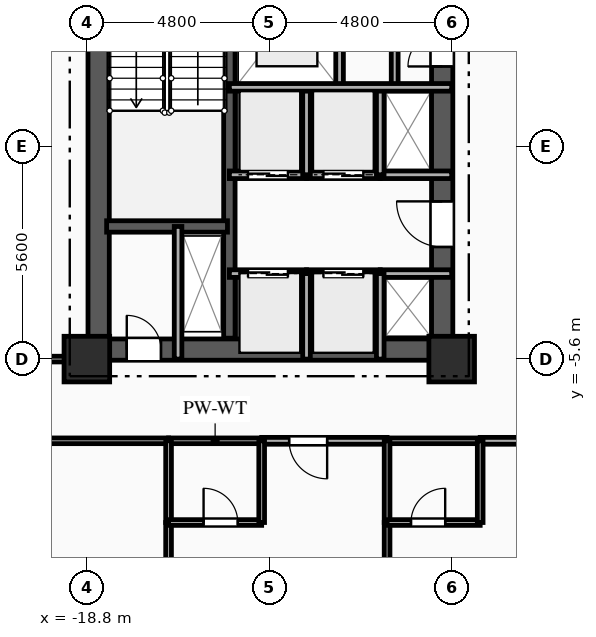
"""IFC4 building model, lengths in metres.
Left out: names, types, materials, properties, quantities, classifications, styles, units other than length and angle.
Written with IfcOpenShell. Run it as: python <this file> out.ifc"""

import sys

from ifc_helpers import new_model, si_unit, direction, frame, frame_2d, origin, origin_2d, place, context, subcontext, project, spatial, rectangle, extrude, element, fill, save


model = new_model("IFC4")
c1 = context("Model", 3, precision=1e-05, world=origin(), true_north=direction((0.0, 1.0)))
c2 = subcontext(c1, "Body", "Model", "MODEL_VIEW")
j1 = project(units=[si_unit("LENGTHUNIT", "METRE"), si_unit("PLANEANGLEUNIT", "RADIAN")], contexts=[c1])
p1 = place(None, origin())
s1 = spatial("IfcSite", under=j1, at=p1, CompositionType="ELEMENT")
p2 = place(p1, origin())
s2 = spatial("IfcBuilding", under=s1, at=p2, CompositionType="ELEMENT")
p3 = place(p2, frame((0.0, 0.0, 70.55)))
s3 = spatial("IfcBuildingStorey", under=s2, at=p3, CompositionType="ELEMENT", Elevation=70.55)
for number, where, z_axis, x_axis in (
    (1, (-18.8, -5.6, 0.0), (0.0, 0.0, 1.0), (1.0, 0.0, 0.0)),
    (2, (-9.2, -5.6, 0.0), (0.0, 0.0, 1.0), (1.0, 0.0, 0.0)),
):
    element("IfcColumn", number, at=place(p3, frame(where, z_axis=z_axis, x_axis=x_axis)), inside=s3, PredefinedType="COLUMN", context=c2, shape_type="SweptSolid", body=[
        extrude(rectangle(XDim=1.2, YDim=1.2, at=origin_2d()), origin(), (0.0, 0.0, 1.0), 3.35),
    ])
p4 = place(p3, frame((-18.8, -5.35, 0.0), z_axis=(0.0, 0.0, 1.0), x_axis=(1.0, 0.0, 0.0)))
e3 = element("IfcWall", 3, at=p4, inside=s3, PredefinedType="SHEAR", context=c2, shape_type="SweptSolid", body=[
    extrude(rectangle(XDim=9.6, YDim=0.56, at=frame_2d((4.8, 0.0))), origin(), (0.0, 0.0, 1.0), 3.0),
])
p5 = place(p4, frame((1.05, 0.0, 0.0)))
e4 = element("IfcOpeningElement", 4, at=p5, cuts=e3, PredefinedType="OPENING", context=c2, shape_type="SweptSolid", body=[
    extrude(rectangle(XDim=0.9, YDim=2.1, at=frame_2d((0.45, 1.05))), frame((0.0, 0.29, 0.0), z_axis=(0.0, -1.0, 0.0), x_axis=(1.0, 0.0, 0.0)), (0.0, 0.0, 1.0), 0.58),
])
p6 = place(p3, frame((-18.49, -5.05, 0.0), z_axis=(0.0, 0.0, 1.0), x_axis=(0.0, 1.0, 0.0)))
e5 = element("IfcWall", 5, at=p6, inside=s3, PredefinedType="SHEAR", context=c2, shape_type="SweptSolid", body=[
    extrude(rectangle(XDim=10.1, YDim=0.56, at=frame_2d((5.05, 0.0))), origin(), (0.0, 0.0, 1.0), 3.0),
])
p7 = place(p3, frame((-9.45, -5.05, 0.0), z_axis=(0.0, 0.0, 1.0), x_axis=(0.0, 1.0, 0.0)))
e6 = element("IfcWall", 6, at=p7, inside=s3, PredefinedType="SHEAR", context=c2, shape_type="SweptSolid", body=[
    extrude(rectangle(XDim=10.1, YDim=0.56, at=frame_2d((5.05, 0.0))), origin(), (0.0, 0.0, 1.0), 3.0),
])
p8 = place(p7, frame((7.15, 0.0, 0.0)))
e7 = element("IfcOpeningElement", 7, at=p8, cuts=e6, PredefinedType="OPENING", context=c2, shape_type="SweptSolid", body=[
    extrude(rectangle(XDim=0.9, YDim=2.1, at=frame_2d((0.45, 1.05))), frame((0.0, 0.29, 0.0), z_axis=(0.0, -1.0, 0.0), x_axis=(1.0, 0.0, 0.0)), (0.0, 0.0, 1.0), 0.58),
])
p9 = place(p7, frame((2.4, 0.0, 0.0)))
e8 = element("IfcOpeningElement", 8, at=p9, cuts=e6, PredefinedType="OPENING", context=c2, shape_type="SweptSolid", body=[
    extrude(rectangle(XDim=1.2, YDim=2.15, at=frame_2d((0.6, 1.075))), frame((0.0, 0.29, 0.0), z_axis=(0.0, -1.0, 0.0), x_axis=(1.0, 0.0, 0.0)), (0.0, 0.0, 1.0), 0.58),
])
p10 = place(p3, frame((-15.05, -5.05, 0.0), z_axis=(0.0, 0.0, 1.0), x_axis=(0.0, 1.0, 0.0)))
e9 = element("IfcWall", 9, at=p10, inside=s3, PredefinedType="SHEAR", context=c2, shape_type="SweptSolid", body=[
    extrude(rectangle(XDim=10.1, YDim=0.3, at=frame_2d((5.05, 0.0))), origin(), (0.0, 0.0, 1.0), 3.0),
])
p11 = place(p3, frame((-18.28, -2.11, 0.0), z_axis=(0.0, 0.0, 1.0), x_axis=(1.0, 0.0, 0.0)))
e10 = element("IfcWall", 10, at=p11, inside=s3, PredefinedType="SHEAR", context=c2, shape_type="SweptSolid", body=[
    extrude(rectangle(XDim=3.18, YDim=0.3, at=frame_2d((1.59, 0.0))), origin(), (0.0, 0.0, 1.0), 3.0),
])
p12 = place(p3, frame((-16.4, -5.6, 0.0), z_axis=(0.0, 0.0, 1.0), x_axis=(0.0, 1.0, 0.0)))
e11 = element("IfcWall", 11, at=p12, inside=s3, PredefinedType="PARTITIONING", context=c2, shape_type="SweptSolid", body=[
    extrude(rectangle(XDim=3.49, YDim=0.2, at=frame_2d((1.745, 0.0))), origin(), (0.0, 0.0, 1.0), 3.0),
])
p13 = place(p3, frame((-12.15, 1.55, 0.0), z_axis=(0.0, 0.0, 1.0), x_axis=(0.0, 1.0, 0.0)))
e12 = element("IfcWall", 12, at=p13, inside=s3, PredefinedType="PARTITIONING", context=c2, shape_type="SweptSolid", body=[
    extrude(rectangle(XDim=4.05, YDim=0.2, at=frame_2d((2.025, 0.0))), origin(), (0.0, 0.0, 1.0), 3.0),
])
p14 = place(p3, frame((-10.7, 5.6, 0.0), z_axis=(0.0, 0.0, 1.0), x_axis=(0.0, -1.0, 0.0)))
e13 = element("IfcWall", 13, at=p14, inside=s3, PredefinedType="PARTITIONING", context=c2, shape_type="SweptSolid", body=[
    extrude(rectangle(XDim=4.05, YDim=0.18, at=frame_2d((2.025, 0.0))), origin(), (0.0, 0.0, 1.0), 3.0),
])
p15 = place(p14, frame((1.325, 0.0, 0.0)))
e14 = element("IfcOpeningElement", 14, at=p15, cuts=e13, PredefinedType="OPENING", context=c2, shape_type="SweptSolid", body=[
    extrude(rectangle(XDim=1.25, YDim=2.2, at=frame_2d((0.625, 1.1))), frame((0.0, 0.1, 0.0), z_axis=(0.0, -1.0, 0.0), x_axis=(1.0, 0.0, 0.0)), (0.0, 0.0, 1.0), 0.2),
])
p16 = place(p3, frame((-15.05, -3.35, 0.0), z_axis=(0.0, 0.0, 1.0), x_axis=(1.0, 0.0, 0.0)))
e15 = element("IfcWall", 15, at=p16, inside=s3, PredefinedType="PARTITIONING", context=c2, shape_type="SweptSolid", body=[
    extrude(rectangle(XDim=2.03, YDim=0.2, at=frame_2d((1.015, 0.0))), origin(), (0.0, 0.0, 1.0), 3.0),
])
p17 = place(p16, frame((0.49, 0.0, 0.0)))
e16 = element("IfcOpeningElement", 16, at=p17, cuts=e15, PredefinedType="OPENING", context=c2, shape_type="SweptSolid", body=[
    extrude(rectangle(XDim=1.05, YDim=2.1, at=frame_2d((0.525, 1.05))), frame((0.0, 0.11, 0.0), z_axis=(0.0, -1.0, 0.0), x_axis=(1.0, 0.0, 0.0)), (0.0, 0.0, 1.0), 0.22),
])
p18 = place(p3, frame((-13.02, -3.35, 0.0), z_axis=(0.0, 0.0, 1.0), x_axis=(1.0, 0.0, 0.0)))
e17 = element("IfcWall", 17, at=p18, inside=s3, PredefinedType="PARTITIONING", context=c2, shape_type="SweptSolid", body=[
    extrude(rectangle(XDim=1.94, YDim=0.2, at=frame_2d((0.97, 0.0))), origin(), (0.0, 0.0, 1.0), 3.0),
])
p19 = place(p18, frame((0.445, 0.0, 0.0)))
e18 = element("IfcOpeningElement", 18, at=p19, cuts=e17, PredefinedType="OPENING", context=c2, shape_type="SweptSolid", body=[
    extrude(rectangle(XDim=1.05, YDim=2.1, at=frame_2d((0.525, 1.05))), frame((0.0, 0.11, 0.0), z_axis=(0.0, -1.0, 0.0), x_axis=(1.0, 0.0, 0.0)), (0.0, 0.0, 1.0), 0.22),
])
p20 = place(p3, frame((-11.08, -3.35, 0.0), z_axis=(0.0, 0.0, 1.0), x_axis=(1.0, 0.0, 0.0)))
e19 = element("IfcWall", 19, at=p20, inside=s3, PredefinedType="PARTITIONING", context=c2, shape_type="SweptSolid", body=[
    extrude(rectangle(XDim=1.88, YDim=0.2, at=frame_2d((0.94, 0.0))), origin(), (0.0, 0.0, 1.0), 2.715),
])
p21 = place(p3, frame((-13.02, -0.75, 0.0), z_axis=(0.0, 0.0, 1.0), x_axis=(-1.0, 0.0, 0.0)))
e20 = element("IfcWall", 20, at=p21, inside=s3, PredefinedType="PARTITIONING", context=c2, shape_type="SweptSolid", body=[
    extrude(rectangle(XDim=2.03, YDim=0.2, at=frame_2d((1.015, 0.0))), origin(), (0.0, 0.0, 1.0), 3.0),
])
p22 = place(p21, frame((0.49, 0.0, 0.0)))
e21 = element("IfcOpeningElement", 21, at=p22, cuts=e20, PredefinedType="OPENING", context=c2, shape_type="SweptSolid", body=[
    extrude(rectangle(XDim=1.05, YDim=2.1, at=frame_2d((0.525, 1.05))), frame((0.0, 0.11, 0.0), z_axis=(0.0, -1.0, 0.0), x_axis=(1.0, 0.0, 0.0)), (0.0, 0.0, 1.0), 0.22),
])
p23 = place(p3, frame((-11.08, -0.75, 0.0), z_axis=(0.0, 0.0, 1.0), x_axis=(-1.0, 0.0, 0.0)))
e22 = element("IfcWall", 22, at=p23, inside=s3, PredefinedType="PARTITIONING", context=c2, shape_type="SweptSolid", body=[
    extrude(rectangle(XDim=1.94, YDim=0.2, at=frame_2d((0.97, 0.0))), origin(), (0.0, 0.0, 1.0), 3.0),
])
p24 = place(p23, frame((0.445, 0.0, 0.0)))
e23 = element("IfcOpeningElement", 23, at=p24, cuts=e22, PredefinedType="OPENING", context=c2, shape_type="SweptSolid", body=[
    extrude(rectangle(XDim=1.05, YDim=2.1, at=frame_2d((0.525, 1.05))), frame((0.0, 0.11, 0.0), z_axis=(0.0, -1.0, 0.0), x_axis=(1.0, 0.0, 0.0)), (0.0, 0.0, 1.0), 0.22),
])
p25 = place(p3, frame((-9.2, -0.75, 0.0), z_axis=(0.0, 0.0, 1.0), x_axis=(-1.0, 0.0, 0.0)))
e24 = element("IfcWall", 24, at=p25, inside=s3, PredefinedType="PARTITIONING", context=c2, shape_type="SweptSolid", body=[
    extrude(rectangle(XDim=1.88, YDim=0.2, at=frame_2d((0.94, 0.0))), origin(), (0.0, 0.0, 1.0), 3.0),
])
for number, where, z_axis, x_axis in (
    (25, (-13.02, -5.6, 0.0), (0.0, 0.0, 1.0), (0.0, 1.0, 0.0)),
    (26, (-11.08, -5.6, 0.0), (0.0, 0.0, 1.0), (0.0, 1.0, 0.0)),
):
    element("IfcWall", number, at=place(p3, frame(where, z_axis=z_axis, x_axis=x_axis)), inside=s3, PredefinedType="PARTITIONING", context=c2, shape_type="SweptSolid", body=[
        extrude(rectangle(XDim=2.25, YDim=0.2, at=frame_2d((1.125, 0.0))), origin(), (0.0, 0.0, 1.0), 3.0),
    ])
for number, where, z_axis, x_axis in (
    (27, (-13.02, -0.75, 0.0), (0.0, 0.0, 1.0), (0.0, 1.0, 0.0)),
    (28, (-11.08, -0.75, 0.0), (0.0, 0.0, 1.0), (0.0, 1.0, 0.0)),
):
    element("IfcWall", number, at=place(p3, frame(where, z_axis=z_axis, x_axis=x_axis)), inside=s3, PredefinedType="PARTITIONING", context=c2, shape_type="SweptSolid", body=[
        extrude(rectangle(XDim=2.3, YDim=0.2, at=frame_2d((1.15, 0.0))), origin(), (0.0, 0.0, 1.0), 3.0),
    ])
p26 = place(p3, frame((-23.0, -5.6, 0.0), z_axis=(0.0, 0.0, 1.0), x_axis=(1.0, 0.0, 0.0)))
e29 = element("IfcWall", 29, at=p26, inside=s3, PredefinedType="PARTITIONING", context=c2, shape_type="SweptSolid", body=[
    extrude(rectangle(XDim=4.2, YDim=0.15, at=frame_2d((2.1, 0.0))), origin(), (0.0, 0.0, 1.0), 3.0),
])
p27 = place(p26, frame((0.829, 0.0, 0.0)))
e30 = element("IfcOpeningElement", 30, at=p27, cuts=e29, PredefinedType="OPENING", context=c2, shape_type="SweptSolid", body=[
    extrude(rectangle(XDim=1.05, YDim=2.15, at=frame_2d((0.525, 1.075))), frame((0.0, 0.085, 0.0), z_axis=(0.0, -1.0, 0.0), x_axis=(1.0, 0.0, 0.0)), (0.0, 0.0, 1.0), 0.17),
])
p28 = place(p3, frame((-16.65, -7.75, 0.0), z_axis=(0.0, 0.0, 1.0), x_axis=(-1.0, 0.0, 0.0)))
e31 = element("IfcWall", 31, at=p28, inside=s3, PredefinedType="PARTITIONING", context=c2, shape_type="SweptSolid", body=[
    extrude(rectangle(XDim=6.35, YDim=0.15, at=frame_2d((3.175, 0.0))), origin(), (0.0, 0.0, 1.0), 3.0),
])
p29 = place(p28, frame((4.202, 0.0, 0.0)))
e32 = element("IfcOpeningElement", 32, at=p29, cuts=e31, PredefinedType="OPENING", context=c2, shape_type="SweptSolid", body=[
    extrude(rectangle(XDim=1.05, YDim=2.15, at=frame_2d((0.525, 1.075))), frame((0.0, 0.085, 0.0), z_axis=(0.0, -1.0, 0.0), x_axis=(1.0, 0.0, 0.0)), (0.0, 0.0, 1.0), 0.17),
])
p30 = place(p3, frame((-10.9, -7.75, 0.0), z_axis=(0.0, 0.0, 1.0), x_axis=(-1.0, 0.0, 0.0)))
e33 = element("IfcWall", 33, at=p30, inside=s3, PredefinedType="PARTITIONING", context=c2, shape_type="SweptSolid", body=[
    extrude(rectangle(XDim=3.3, YDim=0.18, at=frame_2d((1.65, 0.0))), origin(), (0.0, 0.0, 1.0), 3.0),
])
p31 = place(p30, frame((1.577, 0.0, 0.0)))
e34 = element("IfcOpeningElement", 34, at=p31, cuts=e33, PredefinedType="OPENING", context=c2, shape_type="SweptSolid", body=[
    extrude(rectangle(XDim=1.0, YDim=2.15, at=frame_2d((0.5, 1.075))), frame((0.0, 0.1, 0.0), z_axis=(0.0, -1.0, 0.0), x_axis=(1.0, 0.0, 0.0)), (0.0, 0.0, 1.0), 0.2),
])
p32 = place(p3, frame((-14.2, -7.75, 0.0), z_axis=(0.0, 0.0, 1.0), x_axis=(-1.0, 0.0, 0.0)))
e35 = element("IfcWall", 35, at=p32, inside=s3, PredefinedType="PLUMBINGWALL", context=c2, shape_type="SweptSolid", body=[
    extrude(rectangle(XDim=2.45, YDim=0.15, at=frame_2d((1.225, 0.0))), origin(), (0.0, 0.0, 1.0), 3.0),
])
p33 = place(p3, frame((-5.15, -7.75, 0.0), z_axis=(0.0, 0.0, 1.0), x_axis=(-1.0, 0.0, 0.0)))
e36 = element("IfcWall", 36, at=p33, inside=s3, PredefinedType="PARTITIONING", context=c2, shape_type="SweptSolid", body=[
    extrude(rectangle(XDim=3.3, YDim=0.18, at=frame_2d((1.65, 0.0))), origin(), (0.0, 0.0, 1.0), 3.0),
])
p34 = place(p33, frame((0.722, 0.0, 0.0)))
e37 = element("IfcOpeningElement", 37, at=p34, cuts=e36, PredefinedType="OPENING", context=c2, shape_type="SweptSolid", body=[
    extrude(rectangle(XDim=1.0, YDim=2.15, at=frame_2d((0.5, 1.075))), frame((0.0, 0.1, 0.0), z_axis=(0.0, -1.0, 0.0), x_axis=(1.0, 0.0, 0.0)), (0.0, 0.0, 1.0), 0.2),
])
p35 = place(p3, frame((-8.45, -7.75, 0.0), z_axis=(0.0, 0.0, 1.0), x_axis=(-1.0, 0.0, 0.0)))
e38 = element("IfcWall", 38, at=p35, inside=s3, PredefinedType="PLUMBINGWALL", context=c2, shape_type="SweptSolid", body=[
    extrude(rectangle(XDim=2.45, YDim=0.15, at=frame_2d((1.225, 0.0))), origin(), (0.0, 0.0, 1.0), 3.0),
])
p36 = place(p3, frame((-16.65, -9.9, 0.0), z_axis=(0.0, 0.0, 1.0), x_axis=(0.0, -1.0, 0.0)))
e39 = element("IfcWall", 39, at=p36, inside=s3, PredefinedType="PARTITIONING", context=c2, shape_type="SweptSolid", body=[
    extrude(rectangle(XDim=9.5, YDim=0.15, at=frame_2d((4.75, 0.0))), origin(), (0.0, 0.0, 1.0), 3.0),
])
p37 = place(p3, frame((-16.65, -7.75, 0.0), z_axis=(0.0, 0.0, 1.0), x_axis=(0.0, -1.0, 0.0)))
e40 = element("IfcWall", 40, at=p37, inside=s3, PredefinedType="PLUMBINGWALL", context=c2, shape_type="SweptSolid", body=[
    extrude(rectangle(XDim=2.15, YDim=0.15, at=frame_2d((1.075, 0.0))), origin(), (0.0, 0.0, 1.0), 3.0),
])
p38 = place(p3, frame((-16.65, -9.9, 0.0), z_axis=(0.0, 0.0, 1.0), x_axis=(1.0, 0.0, 0.0)))
e41 = element("IfcWall", 41, at=p38, inside=s3, PredefinedType="PLUMBINGWALL", context=c2, shape_type="SweptSolid", body=[
    extrude(rectangle(XDim=2.45, YDim=0.15, at=frame_2d((1.225, 0.0))), origin(), (0.0, 0.0, 1.0), 3.0),
])
p39 = place(p38, frame((0.921, 0.0, 0.0)))
e42 = element("IfcOpeningElement", 42, at=p39, cuts=e41, PredefinedType="OPENING", context=c2, shape_type="SweptSolid", body=[
    extrude(rectangle(XDim=0.9, YDim=2.1, at=frame_2d((0.45, 1.05))), frame((0.0, 0.085, 0.0), z_axis=(0.0, -1.0, 0.0), x_axis=(1.0, 0.0, 0.0)), (0.0, 0.0, 1.0), 0.17),
])
p40 = place(p3, frame((-14.2, -9.9, 0.0), z_axis=(0.0, 0.0, 1.0), x_axis=(0.0, 1.0, 0.0)))
e43 = element("IfcWall", 43, at=p40, inside=s3, PredefinedType="PLUMBINGWALL", context=c2, shape_type="SweptSolid", body=[
    extrude(rectangle(XDim=2.15, YDim=0.15, at=frame_2d((1.075, 0.0))), origin(), (0.0, 0.0, 1.0), 3.0),
])
p41 = place(p3, frame((-10.9, -9.9, 0.0), z_axis=(0.0, 0.0, 1.0), x_axis=(0.0, -1.0, 0.0)))
e44 = element("IfcWall", 44, at=p41, inside=s3, PredefinedType="PARTITIONING", context=c2, shape_type="SweptSolid", body=[
    extrude(rectangle(XDim=9.5, YDim=0.15, at=frame_2d((4.75, 0.0))), origin(), (0.0, 0.0, 1.0), 3.0),
])
p42 = place(p3, frame((-10.9, -7.75, 0.0), z_axis=(0.0, 0.0, 1.0), x_axis=(0.0, -1.0, 0.0)))
e45 = element("IfcWall", 45, at=p42, inside=s3, PredefinedType="PLUMBINGWALL", context=c2, shape_type="SweptSolid", body=[
    extrude(rectangle(XDim=2.15, YDim=0.15, at=frame_2d((1.075, 0.0))), origin(), (0.0, 0.0, 1.0), 3.0),
])
p43 = place(p3, frame((-10.9, -9.9, 0.0), z_axis=(0.0, 0.0, 1.0), x_axis=(1.0, 0.0, 0.0)))
e46 = element("IfcWall", 46, at=p43, inside=s3, PredefinedType="PLUMBINGWALL", context=c2, shape_type="SweptSolid", body=[
    extrude(rectangle(XDim=2.45, YDim=0.15, at=frame_2d((1.225, 0.0))), origin(), (0.0, 0.0, 1.0), 3.0),
])
p44 = place(p43, frame((0.629, 0.0, 0.0)))
e47 = element("IfcOpeningElement", 47, at=p44, cuts=e46, PredefinedType="OPENING", context=c2, shape_type="SweptSolid", body=[
    extrude(rectangle(XDim=0.9, YDim=2.1, at=frame_2d((0.45, 1.05))), frame((0.0, 0.085, 0.0), z_axis=(0.0, -1.0, 0.0), x_axis=(1.0, 0.0, 0.0)), (0.0, 0.0, 1.0), 0.17),
])
p45 = place(p3, frame((-8.45, -9.9, 0.0), z_axis=(0.0, 0.0, 1.0), x_axis=(0.0, 1.0, 0.0)))
e48 = element("IfcWall", 48, at=p45, inside=s3, PredefinedType="PLUMBINGWALL", context=c2, shape_type="SweptSolid", body=[
    extrude(rectangle(XDim=2.15, YDim=0.15, at=frame_2d((1.075, 0.0))), origin(), (0.0, 0.0, 1.0), 3.0),
])
p46 = place(p3, frame((-15.05, 1.55, 0.0), z_axis=(0.0, 0.0, 1.0), x_axis=(1.0, 0.0, 0.0)))
e49 = element("IfcWall", 49, at=p46, inside=s3, PredefinedType="PARTITIONING", context=c2, shape_type="SweptSolid", body=[
    extrude(rectangle(XDim=5.85, YDim=0.2, at=frame_2d((2.925, 0.0))), origin(), (0.0, 0.0, 1.0), 3.0),
])
p47 = place(p5, origin())
e50 = element("IfcDoor", 50, at=p47, inside=s3, OperationType="SINGLE_SWING_LEFT", PredefinedType="DOOR", context=c2, shape_type="SweptSolid", body=[
    extrude(rectangle(XDim=0.9, YDim=2.1, at=frame_2d((0.45, 1.05))), frame((0.0, 0.025, 0.0), z_axis=(0.0, -1.0, 0.0), x_axis=(1.0, 0.0, 0.0)), (0.0, 0.0, 1.0), 0.05),
])
fill(e4, e50)
p48 = place(p8, origin())
e51 = element("IfcDoor", 51, at=p48, inside=s3, OperationType="SINGLE_SWING_LEFT", PredefinedType="DOOR", context=c2, shape_type="SweptSolid", body=[
    extrude(rectangle(XDim=0.9, YDim=2.1, at=frame_2d((0.45, 1.05))), frame((0.0, 0.025, 0.0), z_axis=(0.0, -1.0, 0.0), x_axis=(1.0, 0.0, 0.0)), (0.0, 0.0, 1.0), 0.05),
])
fill(e7, e51)
p49 = place(p17, origin())
e52 = element("IfcDoor", 52, at=p49, inside=s3, OperationType="DOUBLE_DOOR_SLIDING", PredefinedType="DOOR", context=c2, shape_type="SweptSolid", body=[
    extrude(rectangle(XDim=1.05, YDim=2.1, at=frame_2d((0.525, 1.05))), frame((0.0, 0.025, 0.0), z_axis=(0.0, -1.0, 0.0), x_axis=(1.0, 0.0, 0.0)), (0.0, 0.0, 1.0), 0.05),
])
fill(e16, e52)
p50 = place(p19, origin())
e53 = element("IfcDoor", 53, at=p50, inside=s3, OperationType="DOUBLE_DOOR_SLIDING", PredefinedType="DOOR", context=c2, shape_type="SweptSolid", body=[
    extrude(rectangle(XDim=1.05, YDim=2.1, at=frame_2d((0.525, 1.05))), frame((0.0, 0.025, 0.0), z_axis=(0.0, -1.0, 0.0), x_axis=(1.0, 0.0, 0.0)), (0.0, 0.0, 1.0), 0.05),
])
fill(e18, e53)
p51 = place(p22, origin())
e54 = element("IfcDoor", 54, at=p51, inside=s3, OperationType="DOUBLE_DOOR_SLIDING", PredefinedType="DOOR", context=c2, shape_type="SweptSolid", body=[
    extrude(rectangle(XDim=1.05, YDim=2.1, at=frame_2d((0.525, 1.05))), frame((0.0, 0.025, 0.0), z_axis=(0.0, -1.0, 0.0), x_axis=(1.0, 0.0, 0.0)), (0.0, 0.0, 1.0), 0.05),
])
fill(e21, e54)
p52 = place(p24, origin())
e55 = element("IfcDoor", 55, at=p52, inside=s3, OperationType="DOUBLE_DOOR_SLIDING", PredefinedType="DOOR", context=c2, shape_type="SweptSolid", body=[
    extrude(rectangle(XDim=1.05, YDim=2.1, at=frame_2d((0.525, 1.05))), frame((0.0, 0.025, 0.0), z_axis=(0.0, -1.0, 0.0), x_axis=(1.0, 0.0, 0.0)), (0.0, 0.0, 1.0), 0.05),
])
fill(e23, e55)
p53 = place(p9, origin())
e56 = element("IfcDoor", 56, at=p53, inside=s3, OperationType="SINGLE_SWING_RIGHT", PredefinedType="DOOR", context=c2, shape_type="SweptSolid", body=[
    extrude(rectangle(XDim=1.2, YDim=2.15, at=frame_2d((0.6, 1.075))), frame((0.0, 0.025, 0.0), z_axis=(0.0, -1.0, 0.0), x_axis=(1.0, 0.0, 0.0)), (0.0, 0.0, 1.0), 0.05),
])
fill(e8, e56)
p54 = place(p31, origin())
e57 = element("IfcDoor", 57, at=p54, inside=s3, OperationType="SINGLE_SWING_LEFT", PredefinedType="DOOR", context=c2, shape_type="SweptSolid", body=[
    extrude(rectangle(XDim=1.0, YDim=2.15, at=frame_2d((0.5, 1.075))), frame((0.0, 0.025, 0.0), z_axis=(0.0, -1.0, 0.0), x_axis=(1.0, 0.0, 0.0)), (0.0, 0.0, 1.0), 0.05),
])
fill(e34, e57)
p55 = place(p39, origin())
e58 = element("IfcDoor", 58, at=p55, inside=s3, OperationType="SINGLE_SWING_LEFT", PredefinedType="DOOR", context=c2, shape_type="SweptSolid", body=[
    extrude(rectangle(XDim=0.9, YDim=2.1, at=frame_2d((0.45, 1.05))), frame((0.0, 0.025, 0.0), z_axis=(0.0, -1.0, 0.0), x_axis=(1.0, 0.0, 0.0)), (0.0, 0.0, 1.0), 0.05),
])
fill(e42, e58)
p56 = place(p44, origin())
e59 = element("IfcDoor", 59, at=p56, inside=s3, OperationType="SINGLE_SWING_RIGHT", PredefinedType="DOOR", context=c2, shape_type="SweptSolid", body=[
    extrude(rectangle(XDim=0.9, YDim=2.1, at=frame_2d((0.45, 1.05))), frame((0.0, 0.025, 0.0), z_axis=(0.0, -1.0, 0.0), x_axis=(1.0, 0.0, 0.0)), (0.0, 0.0, 1.0), 0.05),
])
fill(e47, e59)
save(model, sys.argv[1])
